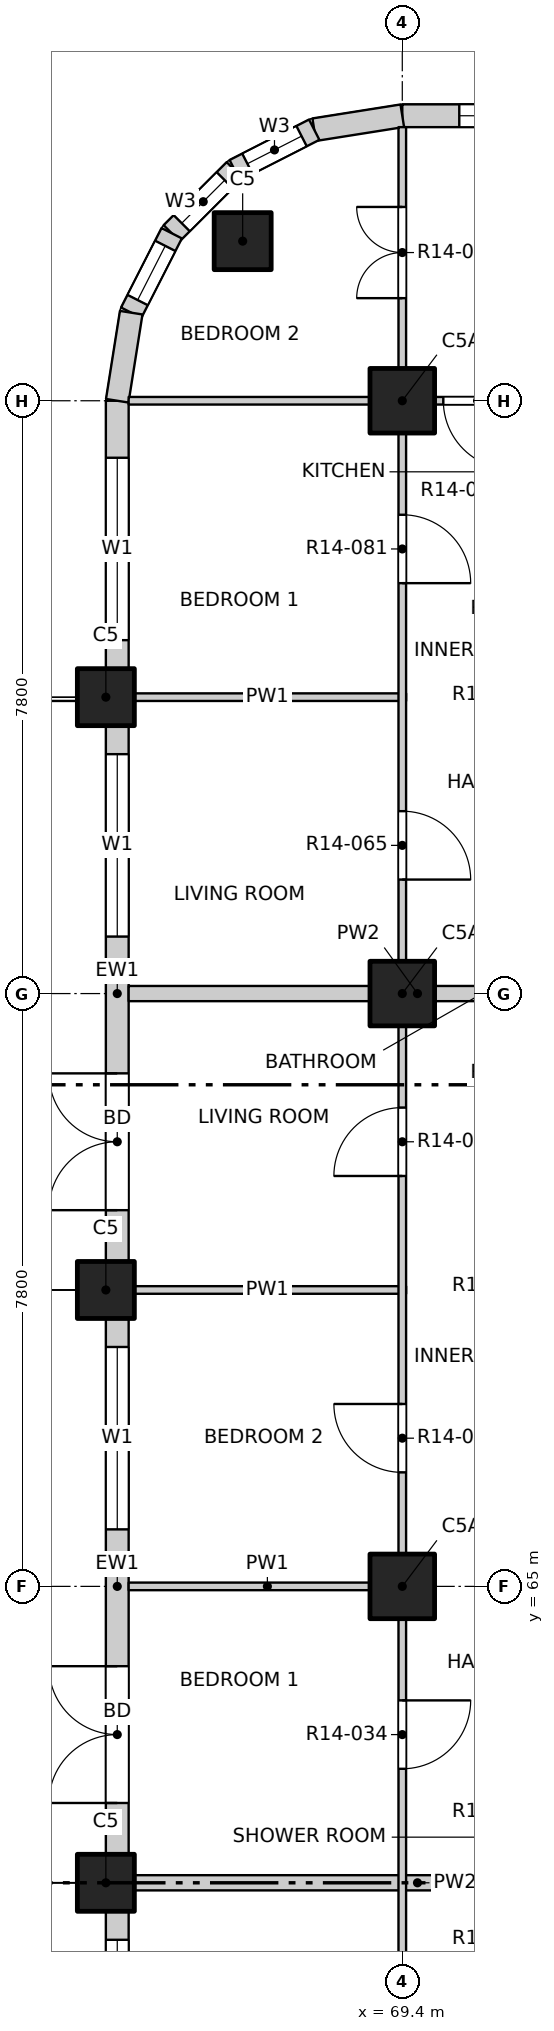
"""IFC4 building model, lengths in metres.
Left out: names, types, materials, properties, quantities, classifications, styles, units other than length and angle.
Written with IfcOpenShell. Run it as: python <this file> out.ifc"""

import sys

from ifc_helpers import new_model, si_unit, direction, frame, frame_2d, origin, origin_2d, place, context, subcontext, project, spatial, rectangle, extrude, element, fill, save


model = new_model("IFC4")
c1 = context("Model", 3, precision=1e-05, world=origin(), true_north=direction((0.0, 1.0)))
c2 = subcontext(c1, "Body", "Model", "MODEL_VIEW")
j1 = project(units=[si_unit("LENGTHUNIT", "METRE"), si_unit("PLANEANGLEUNIT", "RADIAN")], contexts=[c1])
p1 = place(None, origin())
s1 = spatial("IfcSite", under=j1, at=p1, CompositionType="ELEMENT")
p2 = place(p1, origin())
s2 = spatial("IfcBuilding", under=s1, at=p2, CompositionType="ELEMENT")
p3 = place(p2, frame((0.0, 0.0, 155.4)))
s3 = spatial("IfcBuildingStorey", under=s2, at=p3, CompositionType="ELEMENT", Elevation=155.4)
for number, where, z_axis, x_axis in (
    (1, (67.3, 82.7, -0.25), (0.0, 0.0, 1.0), (1.0, 0.0, 0.0)),
    (2, (65.5, 61.1, -0.25), (0.0, 0.0, 1.0), (1.0, 0.0, 0.0)),
    (3, (65.5, 68.9, -0.25), (0.0, 0.0, 1.0), (1.0, 0.0, 0.0)),
    (4, (65.5, 76.7, -0.25), (0.0, 0.0, 1.0), (1.0, 0.0, 0.0)),
):
    element("IfcColumn", number, at=place(p3, frame(where, z_axis=z_axis, x_axis=x_axis)), inside=s3, PredefinedType="COLUMN", context=c2, shape_type="SweptSolid", body=[
        extrude(rectangle(XDim=0.75, YDim=0.75, at=origin_2d()), origin(), (0.0, 0.0, 1.0), 3.4),
    ])
for number, where, z_axis, x_axis in (
    (5, (69.4, 65.0, -0.25), (0.0, 0.0, 1.0), (1.0, 0.0, 0.0)),
    (6, (69.4, 72.8, -0.25), (0.0, 0.0, 1.0), (1.0, 0.0, 0.0)),
    (7, (69.4, 80.6, -0.25), (0.0, 0.0, 1.0), (1.0, 0.0, 0.0)),
):
    element("IfcColumn", number, at=place(p3, frame(where, z_axis=z_axis, x_axis=x_axis)), inside=s3, PredefinedType="COLUMN", context=c2, shape_type="SweptSolid", body=[
        extrude(rectangle(XDim=0.85, YDim=0.85, at=origin_2d()), origin(), (0.0, 0.0, 1.0), 3.4),
    ])
p4 = place(p3, frame((69.4, 84.35, 0.0), z_axis=(0.0, 0.0, 1.0), x_axis=(1.0, 0.0, 0.0)))
e8 = element("IfcWall", 8, at=p4, inside=s3, PredefinedType="SOLIDWALL", context=c2, shape_type="SweptSolid", body=[
    extrude(rectangle(XDim=3.525, YDim=0.3, at=frame_2d((1.763, 0.0))), origin(), (0.0, 0.0, 1.0), 2.7),
])
p5 = place(p4, frame((0.75, 0.0, 0.9)))
e9 = element("IfcOpeningElement", 9, at=p5, cuts=e8, PredefinedType="OPENING", context=c2, shape_type="SweptSolid", body=[
    extrude(rectangle(XDim=2.4, YDim=1.8, at=frame_2d((1.2, 0.9))), frame((0.0, 0.16, 0.0), z_axis=(0.0, -1.0, 0.0), x_axis=(1.0, 0.0, 0.0)), (0.0, 0.0, 1.0), 0.32),
])
p6 = place(p3, frame((65.65, 53.675, 0.0), z_axis=(0.0, 0.0, 1.0), x_axis=(0.0, 1.0, 0.0)))
e10 = element("IfcWall", 10, at=p6, inside=s3, PredefinedType="SOLIDWALL", context=c2, shape_type="SweptSolid", body=[
    extrude(rectangle(XDim=7.05, YDim=0.3, at=frame_2d((3.525, 0.0))), origin(), (0.0, 0.0, 1.0), 2.7),
])
p7 = place(p6, frame((0.675, 0.0, 0.0)))
e11 = element("IfcOpeningElement", 11, at=p7, cuts=e10, PredefinedType="OPENING", context=c2, shape_type="SweptSolid", body=[
    extrude(rectangle(XDim=1.8, YDim=2.4, at=frame_2d((0.9, 1.2))), frame((0.0, 0.16, 0.0), z_axis=(0.0, -1.0, 0.0), x_axis=(1.0, 0.0, 0.0)), (0.0, 0.0, 1.0), 0.32),
])
p8 = place(p6, frame((4.275, 0.0, 0.9)))
e12 = element("IfcOpeningElement", 12, at=p8, cuts=e10, PredefinedType="OPENING", context=c2, shape_type="SweptSolid", body=[
    extrude(rectangle(XDim=2.4, YDim=1.8, at=frame_2d((1.2, 0.9))), frame((0.0, 0.16, 0.0), z_axis=(0.0, -1.0, 0.0), x_axis=(1.0, 0.0, 0.0)), (0.0, 0.0, 1.0), 0.32),
])
p9 = place(p3, frame((65.65, 61.475, 0.0), z_axis=(0.0, 0.0, 1.0), x_axis=(0.0, 1.0, 0.0)))
e13 = element("IfcWall", 13, at=p9, inside=s3, PredefinedType="SOLIDWALL", context=c2, shape_type="SweptSolid", body=[
    extrude(rectangle(XDim=7.05, YDim=0.3, at=frame_2d((3.525, 0.0))), origin(), (0.0, 0.0, 1.0), 2.7),
])
p10 = place(p9, frame((0.675, 0.0, 0.0)))
e14 = element("IfcOpeningElement", 14, at=p10, cuts=e13, PredefinedType="OPENING", context=c2, shape_type="SweptSolid", body=[
    extrude(rectangle(XDim=1.8, YDim=2.4, at=frame_2d((0.9, 1.2))), frame((0.0, 0.16, 0.0), z_axis=(0.0, -1.0, 0.0), x_axis=(1.0, 0.0, 0.0)), (0.0, 0.0, 1.0), 0.32),
])
p11 = place(p9, frame((4.275, 0.0, 0.9)))
e15 = element("IfcOpeningElement", 15, at=p11, cuts=e13, PredefinedType="OPENING", context=c2, shape_type="SweptSolid", body=[
    extrude(rectangle(XDim=2.4, YDim=1.8, at=frame_2d((1.2, 0.9))), frame((0.0, 0.16, 0.0), z_axis=(0.0, -1.0, 0.0), x_axis=(1.0, 0.0, 0.0)), (0.0, 0.0, 1.0), 0.32),
])
p12 = place(p3, frame((65.65, 69.275, 0.0), z_axis=(0.0, 0.0, 1.0), x_axis=(0.0, 1.0, 0.0)))
e16 = element("IfcWall", 16, at=p12, inside=s3, PredefinedType="SOLIDWALL", context=c2, shape_type="SweptSolid", body=[
    extrude(rectangle(XDim=7.05, YDim=0.3, at=frame_2d((3.525, 0.0))), origin(), (0.0, 0.0, 1.0), 2.7),
])
p13 = place(p12, frame((0.675, 0.0, 0.0)))
e17 = element("IfcOpeningElement", 17, at=p13, cuts=e16, PredefinedType="OPENING", context=c2, shape_type="SweptSolid", body=[
    extrude(rectangle(XDim=1.8, YDim=2.4, at=frame_2d((0.9, 1.2))), frame((0.0, 0.16, 0.0), z_axis=(0.0, -1.0, 0.0), x_axis=(1.0, 0.0, 0.0)), (0.0, 0.0, 1.0), 0.32),
])
p14 = place(p12, frame((4.275, 0.0, 0.9)))
e18 = element("IfcOpeningElement", 18, at=p14, cuts=e16, PredefinedType="OPENING", context=c2, shape_type="SweptSolid", body=[
    extrude(rectangle(XDim=2.4, YDim=1.8, at=frame_2d((1.2, 0.9))), frame((0.0, 0.16, 0.0), z_axis=(0.0, -1.0, 0.0), x_axis=(1.0, 0.0, 0.0)), (0.0, 0.0, 1.0), 0.32),
])
p15 = place(p3, frame((65.65, 77.075, 0.0), z_axis=(0.0, 0.0, 1.0), x_axis=(0.0, 1.0, 0.0)))
e19 = element("IfcWall", 19, at=p15, inside=s3, PredefinedType="SOLIDWALL", context=c2, shape_type="SweptSolid", body=[
    extrude(rectangle(XDim=3.525, YDim=0.3, at=frame_2d((1.763, 0.0))), origin(), (0.0, 0.0, 1.0), 2.7),
])
p16 = place(p15, frame((0.375, 0.0, 0.9)))
e20 = element("IfcOpeningElement", 20, at=p16, cuts=e19, PredefinedType="OPENING", context=c2, shape_type="SweptSolid", body=[
    extrude(rectangle(XDim=2.4, YDim=1.8, at=frame_2d((1.2, 0.9))), frame((0.0, 0.16, 0.0), z_axis=(0.0, -1.0, 0.0), x_axis=(1.0, 0.0, 0.0)), (0.0, 0.0, 1.0), 0.32),
])
p17 = place(p3, frame((69.4, 84.35, 0.0), z_axis=(0.0, 0.0, 1.0), x_axis=(-0.987678452879, -0.156496880861, 0.0)))
e21 = element("IfcWall", 21, at=p17, inside=s3, PredefinedType="SOLIDWALL", context=c2, shape_type="SweptSolid", body=[
    extrude(rectangle(XDim=1.173, YDim=0.3, at=frame_2d((0.586, 0.0))), origin(), (0.0, 0.0, 1.0), 2.7),
])
p18 = place(p3, frame((68.241, 84.167, 0.0), z_axis=(0.0, 0.0, 1.0), x_axis=(-0.890988677504, -0.454025524128, 0.0)))
e22 = element("IfcWall", 22, at=p18, inside=s3, PredefinedType="SOLIDWALL", context=c2, shape_type="SweptSolid", body=[
    extrude(rectangle(XDim=1.173, YDim=0.3, at=frame_2d((0.587, 0.0))), origin(), (0.0, 0.0, 1.0), 2.7),
])
p19 = place(p18, frame((0.187, 0.0, 0.9)))
e23 = element("IfcOpeningElement", 23, at=p19, cuts=e22, PredefinedType="OPENING", context=c2, shape_type="SweptSolid", body=[
    extrude(rectangle(XDim=0.8, YDim=1.2, at=frame_2d((0.4, 0.6))), frame((0.0, 0.16, 0.0), z_axis=(0.0, -1.0, 0.0), x_axis=(1.0, 0.0, 0.0)), (0.0, 0.0, 1.0), 0.32),
])
p20 = place(p3, frame((67.196, 83.634, 0.0), z_axis=(0.0, 0.0, 1.0), x_axis=(-0.707106781187, -0.707106781187, 0.0)))
e24 = element("IfcWall", 24, at=p20, inside=s3, PredefinedType="SOLIDWALL", context=c2, shape_type="SweptSolid", body=[
    extrude(rectangle(XDim=1.173, YDim=0.3, at=frame_2d((0.586, 0.0))), origin(), (0.0, 0.0, 1.0), 2.7),
])
p21 = place(p20, frame((0.187, 0.0, 0.9)))
e25 = element("IfcOpeningElement", 25, at=p21, cuts=e24, PredefinedType="OPENING", context=c2, shape_type="SweptSolid", body=[
    extrude(rectangle(XDim=0.8, YDim=1.2, at=frame_2d((0.4, 0.6))), frame((0.0, 0.16, 0.0), z_axis=(0.0, -1.0, 0.0), x_axis=(1.0, 0.0, 0.0)), (0.0, 0.0, 1.0), 0.32),
])
p22 = place(p3, frame((66.366, 82.804, 0.0), z_axis=(0.0, 0.0, 1.0), x_axis=(-0.454025524128, -0.890988677504, 0.0)))
e26 = element("IfcWall", 26, at=p22, inside=s3, PredefinedType="SOLIDWALL", context=c2, shape_type="SweptSolid", body=[
    extrude(rectangle(XDim=1.173, YDim=0.3, at=frame_2d((0.587, 0.0))), origin(), (0.0, 0.0, 1.0), 2.7),
])
p23 = place(p22, frame((0.187, 0.0, 0.9)))
e27 = element("IfcOpeningElement", 27, at=p23, cuts=e26, PredefinedType="OPENING", context=c2, shape_type="SweptSolid", body=[
    extrude(rectangle(XDim=0.8, YDim=1.2, at=frame_2d((0.4, 0.6))), frame((0.0, 0.16, 0.0), z_axis=(0.0, -1.0, 0.0), x_axis=(1.0, 0.0, 0.0)), (0.0, 0.0, 1.0), 0.32),
])
p24 = place(p3, frame((65.833, 81.759, 0.0), z_axis=(0.0, 0.0, 1.0), x_axis=(-0.156496880861, -0.987678452879, 0.0)))
e28 = element("IfcWall", 28, at=p24, inside=s3, PredefinedType="SOLIDWALL", context=c2, shape_type="SweptSolid", body=[
    extrude(rectangle(XDim=1.173, YDim=0.3, at=frame_2d((0.586, 0.0))), origin(), (0.0, 0.0, 1.0), 2.7),
])
p25 = place(p3, frame((65.8, 61.1, 0.0), z_axis=(0.0, 0.0, 1.0), x_axis=(1.0, 0.0, 0.0)))
e29 = element("IfcWall", 29, at=p25, inside=s3, PredefinedType="PARTITIONING", context=c2, shape_type="SweptSolid", body=[
    extrude(rectangle(XDim=7.6, YDim=0.2, at=frame_2d((3.8, 0.0))), origin(), (0.0, 0.0, 1.0), 2.55),
])
p26 = place(p3, frame((65.8, 65.0, 0.0), z_axis=(0.0, 0.0, 1.0), x_axis=(1.0, 0.0, 0.0)))
e30 = element("IfcWall", 30, at=p26, inside=s3, PredefinedType="PARTITIONING", context=c2, shape_type="SweptSolid", body=[
    extrude(rectangle(XDim=3.65, YDim=0.1, at=frame_2d((1.825, 0.0))), origin(), (0.0, 0.0, 1.0), 3.15),
])
p27 = place(p3, frame((65.8, 68.9, 0.0), z_axis=(0.0, 0.0, 1.0), x_axis=(1.0, 0.0, 0.0)))
e31 = element("IfcWall", 31, at=p27, inside=s3, PredefinedType="PARTITIONING", context=c2, shape_type="SweptSolid", body=[
    extrude(rectangle(XDim=3.65, YDim=0.1, at=frame_2d((1.825, 0.0))), origin(), (0.0, 0.0, 1.0), 2.55),
])
p28 = place(p3, frame((65.8, 72.8, 0.0), z_axis=(0.0, 0.0, 1.0), x_axis=(1.0, 0.0, 0.0)))
e32 = element("IfcWall", 32, at=p28, inside=s3, PredefinedType="PARTITIONING", context=c2, shape_type="SweptSolid", body=[
    extrude(rectangle(XDim=7.6, YDim=0.2, at=frame_2d((3.8, 0.0))), origin(), (0.0, 0.0, 1.0), 3.15),
])
p29 = place(p3, frame((65.8, 76.7, 0.0), z_axis=(0.0, 0.0, 1.0), x_axis=(1.0, 0.0, 0.0)))
e33 = element("IfcWall", 33, at=p29, inside=s3, PredefinedType="PARTITIONING", context=c2, shape_type="SweptSolid", body=[
    extrude(rectangle(XDim=3.65, YDim=0.1, at=frame_2d((1.825, 0.0))), origin(), (0.0, 0.0, 1.0), 2.55),
])
p30 = place(p3, frame((65.8, 80.6, 0.0), z_axis=(0.0, 0.0, 1.0), x_axis=(1.0, 0.0, 0.0)))
e34 = element("IfcWall", 34, at=p30, inside=s3, PredefinedType="PARTITIONING", context=c2, shape_type="SweptSolid", body=[
    extrude(rectangle(XDim=7.6, YDim=0.1, at=frame_2d((3.8, 0.0))), origin(), (0.0, 0.0, 1.0), 3.15),
])
p31 = place(p30, frame((4.14, 0.0, 0.0)))
e35 = element("IfcOpeningElement", 35, at=p31, cuts=e34, PredefinedType="OPENING", context=c2, shape_type="SweptSolid", body=[
    extrude(rectangle(XDim=0.9, YDim=2.1, at=frame_2d((0.45, 1.05))), frame((0.0, 0.06, 0.0), z_axis=(0.0, -1.0, 0.0), x_axis=(1.0, 0.0, 0.0)), (0.0, 0.0, 1.0), 0.12),
])
p32 = place(p3, frame((69.4, 45.8, 0.0), z_axis=(0.0, 0.0, 1.0), x_axis=(0.0, 1.0, 0.0)))
e36 = element("IfcWall", 36, at=p32, inside=s3, PredefinedType="PARTITIONING", context=c2, shape_type="SweptSolid", body=[
    extrude(rectangle(XDim=38.4, YDim=0.1, at=frame_2d((19.2, 0.0))), origin(), (0.0, 0.0, 1.0), 3.15),
])
p33 = place(p32, frame((1.05, 0.0, 0.0)))
e37 = element("IfcOpeningElement", 37, at=p33, cuts=e36, PredefinedType="OPENING", context=c2, shape_type="SweptSolid", body=[
    extrude(rectangle(XDim=1.2, YDim=2.1, at=frame_2d((0.6, 1.05))), frame((0.0, 0.06, 0.0), z_axis=(0.0, -1.0, 0.0), x_axis=(1.0, 0.0, 0.0)), (0.0, 0.0, 1.0), 0.12),
])
p34 = place(p32, frame((6.9, 0.0, 0.0)))
e38 = element("IfcOpeningElement", 38, at=p34, cuts=e36, PredefinedType="OPENING", context=c2, shape_type="SweptSolid", body=[
    extrude(rectangle(XDim=1.2, YDim=2.1, at=frame_2d((0.6, 1.05))), frame((0.0, 0.06, 0.0), z_axis=(0.0, -1.0, 0.0), x_axis=(1.0, 0.0, 0.0)), (0.0, 0.0, 1.0), 0.12),
])
p35 = place(p32, frame((12.9, 0.0, 0.0)))
e39 = element("IfcOpeningElement", 39, at=p35, cuts=e36, PredefinedType="OPENING", context=c2, shape_type="SweptSolid", body=[
    extrude(rectangle(XDim=0.9, YDim=2.1, at=frame_2d((0.45, 1.05))), frame((0.0, 0.06, 0.0), z_axis=(0.0, -1.0, 0.0), x_axis=(1.0, 0.0, 0.0)), (0.0, 0.0, 1.0), 0.12),
])
p36 = place(p32, frame((16.8, 0.0, 0.0)))
e40 = element("IfcOpeningElement", 40, at=p36, cuts=e36, PredefinedType="OPENING", context=c2, shape_type="SweptSolid", body=[
    extrude(rectangle(XDim=0.9, YDim=2.1, at=frame_2d((0.45, 1.05))), frame((0.0, 0.06, 0.0), z_axis=(0.0, -1.0, 0.0), x_axis=(1.0, 0.0, 0.0)), (0.0, 0.0, 1.0), 0.12),
])
p37 = place(p32, frame((20.7, 0.0, 0.0)))
e41 = element("IfcOpeningElement", 41, at=p37, cuts=e36, PredefinedType="OPENING", context=c2, shape_type="SweptSolid", body=[
    extrude(rectangle(XDim=0.9, YDim=2.1, at=frame_2d((0.45, 1.05))), frame((0.0, 0.06, 0.0), z_axis=(0.0, -1.0, 0.0), x_axis=(1.0, 0.0, 0.0)), (0.0, 0.0, 1.0), 0.12),
])
p38 = place(p32, frame((24.6, 0.0, 0.0)))
e42 = element("IfcOpeningElement", 42, at=p38, cuts=e36, PredefinedType="OPENING", context=c2, shape_type="SweptSolid", body=[
    extrude(rectangle(XDim=0.9, YDim=2.1, at=frame_2d((0.45, 1.05))), frame((0.0, 0.06, 0.0), z_axis=(0.0, -1.0, 0.0), x_axis=(1.0, 0.0, 0.0)), (0.0, 0.0, 1.0), 0.12),
])
p39 = place(p32, frame((28.5, 0.0, 0.0)))
e43 = element("IfcOpeningElement", 43, at=p39, cuts=e36, PredefinedType="OPENING", context=c2, shape_type="SweptSolid", body=[
    extrude(rectangle(XDim=0.9, YDim=2.1, at=frame_2d((0.45, 1.05))), frame((0.0, 0.06, 0.0), z_axis=(0.0, -1.0, 0.0), x_axis=(1.0, 0.0, 0.0)), (0.0, 0.0, 1.0), 0.12),
])
p40 = place(p32, frame((32.4, 0.0, 0.0)))
e44 = element("IfcOpeningElement", 44, at=p40, cuts=e36, PredefinedType="OPENING", context=c2, shape_type="SweptSolid", body=[
    extrude(rectangle(XDim=0.9, YDim=2.1, at=frame_2d((0.45, 1.05))), frame((0.0, 0.06, 0.0), z_axis=(0.0, -1.0, 0.0), x_axis=(1.0, 0.0, 0.0)), (0.0, 0.0, 1.0), 0.12),
])
p41 = place(p32, frame((36.15, 0.0, 0.0)))
e45 = element("IfcOpeningElement", 45, at=p41, cuts=e36, PredefinedType="OPENING", context=c2, shape_type="SweptSolid", body=[
    extrude(rectangle(XDim=1.2, YDim=2.1, at=frame_2d((0.6, 1.05))), frame((0.0, 0.06, 0.0), z_axis=(0.0, -1.0, 0.0), x_axis=(1.0, 0.0, 0.0)), (0.0, 0.0, 1.0), 0.12),
])
p42 = place(p5, origin())
e46 = element("IfcWindow", 46, at=p42, inside=s3, PartitioningType="DOUBLE_PANEL_VERTICAL", PredefinedType="WINDOW", context=c2, shape_type="SweptSolid", body=[
    extrude(rectangle(XDim=2.4, YDim=1.8, at=frame_2d((1.2, 0.9))), frame((0.0, 0.03, 0.0), z_axis=(0.0, -1.0, 0.0), x_axis=(1.0, 0.0, 0.0)), (0.0, 0.0, 1.0), 0.06),
])
fill(e9, e46)
p43 = place(p8, origin())
e47 = element("IfcWindow", 47, at=p43, inside=s3, PartitioningType="DOUBLE_PANEL_VERTICAL", PredefinedType="WINDOW", context=c2, shape_type="SweptSolid", body=[
    extrude(rectangle(XDim=2.4, YDim=1.8, at=frame_2d((1.2, 0.9))), frame((0.0, 0.03, 0.0), z_axis=(0.0, -1.0, 0.0), x_axis=(1.0, 0.0, 0.0)), (0.0, 0.0, 1.0), 0.06),
])
fill(e12, e47)
p44 = place(p10, origin())
e48 = element("IfcDoor", 48, at=p44, inside=s3, OperationType="DOUBLE_DOOR_SINGLE_SWING", PredefinedType="DOOR", context=c2, shape_type="SweptSolid", body=[
    extrude(rectangle(XDim=1.8, YDim=2.4, at=frame_2d((0.9, 1.2))), frame((0.0, 0.025, 0.0), z_axis=(0.0, -1.0, 0.0), x_axis=(1.0, 0.0, 0.0)), (0.0, 0.0, 1.0), 0.05),
])
fill(e14, e48)
p45 = place(p11, origin())
e49 = element("IfcWindow", 49, at=p45, inside=s3, PartitioningType="DOUBLE_PANEL_VERTICAL", PredefinedType="WINDOW", context=c2, shape_type="SweptSolid", body=[
    extrude(rectangle(XDim=2.4, YDim=1.8, at=frame_2d((1.2, 0.9))), frame((0.0, 0.03, 0.0), z_axis=(0.0, -1.0, 0.0), x_axis=(1.0, 0.0, 0.0)), (0.0, 0.0, 1.0), 0.06),
])
fill(e15, e49)
p46 = place(p13, origin())
e50 = element("IfcDoor", 50, at=p46, inside=s3, OperationType="DOUBLE_DOOR_SINGLE_SWING", PredefinedType="DOOR", context=c2, shape_type="SweptSolid", body=[
    extrude(rectangle(XDim=1.8, YDim=2.4, at=frame_2d((0.9, 1.2))), frame((0.0, 0.025, 0.0), z_axis=(0.0, -1.0, 0.0), x_axis=(1.0, 0.0, 0.0)), (0.0, 0.0, 1.0), 0.05),
])
fill(e17, e50)
p47 = place(p14, origin())
e51 = element("IfcWindow", 51, at=p47, inside=s3, PartitioningType="DOUBLE_PANEL_VERTICAL", PredefinedType="WINDOW", context=c2, shape_type="SweptSolid", body=[
    extrude(rectangle(XDim=2.4, YDim=1.8, at=frame_2d((1.2, 0.9))), frame((0.0, 0.03, 0.0), z_axis=(0.0, -1.0, 0.0), x_axis=(1.0, 0.0, 0.0)), (0.0, 0.0, 1.0), 0.06),
])
fill(e18, e51)
p48 = place(p16, origin())
e52 = element("IfcWindow", 52, at=p48, inside=s3, PartitioningType="DOUBLE_PANEL_VERTICAL", PredefinedType="WINDOW", context=c2, shape_type="SweptSolid", body=[
    extrude(rectangle(XDim=2.4, YDim=1.8, at=frame_2d((1.2, 0.9))), frame((0.0, 0.03, 0.0), z_axis=(0.0, -1.0, 0.0), x_axis=(1.0, 0.0, 0.0)), (0.0, 0.0, 1.0), 0.06),
])
fill(e20, e52)
p49 = place(p19, origin())
e53 = element("IfcWindow", 53, at=p49, inside=s3, PartitioningType="SINGLE_PANEL", PredefinedType="WINDOW", context=c2, shape_type="SweptSolid", body=[
    extrude(rectangle(XDim=0.8, YDim=1.2, at=frame_2d((0.4, 0.6))), frame((0.0, 0.03, 0.0), z_axis=(0.0, -1.0, 0.0), x_axis=(1.0, 0.0, 0.0)), (0.0, 0.0, 1.0), 0.06),
])
fill(e23, e53)
p50 = place(p21, origin())
e54 = element("IfcWindow", 54, at=p50, inside=s3, PartitioningType="SINGLE_PANEL", PredefinedType="WINDOW", context=c2, shape_type="SweptSolid", body=[
    extrude(rectangle(XDim=0.8, YDim=1.2, at=frame_2d((0.4, 0.6))), frame((0.0, 0.03, 0.0), z_axis=(0.0, -1.0, 0.0), x_axis=(1.0, 0.0, 0.0)), (0.0, 0.0, 1.0), 0.06),
])
fill(e25, e54)
p51 = place(p23, origin())
e55 = element("IfcWindow", 55, at=p51, inside=s3, PartitioningType="SINGLE_PANEL", PredefinedType="WINDOW", context=c2, shape_type="SweptSolid", body=[
    extrude(rectangle(XDim=0.8, YDim=1.2, at=frame_2d((0.4, 0.6))), frame((0.0, 0.03, 0.0), z_axis=(0.0, -1.0, 0.0), x_axis=(1.0, 0.0, 0.0)), (0.0, 0.0, 1.0), 0.06),
])
fill(e27, e55)
p52 = place(p36, origin())
e56 = element("IfcDoor", 56, at=p52, inside=s3, OperationType="SINGLE_SWING_LEFT", PredefinedType="DOOR", context=c2, shape_type="SweptSolid", body=[
    extrude(rectangle(XDim=0.9, YDim=2.1, at=frame_2d((0.45, 1.05))), frame((0.0, 0.025, 0.0), z_axis=(0.0, -1.0, 0.0), x_axis=(1.0, 0.0, 0.0)), (0.0, 0.0, 1.0), 0.05),
])
fill(e40, e56)
p53 = place(p37, origin())
e57 = element("IfcDoor", 57, at=p53, inside=s3, OperationType="SINGLE_SWING_RIGHT", PredefinedType="DOOR", context=c2, shape_type="SweptSolid", body=[
    extrude(rectangle(XDim=0.9, YDim=2.1, at=frame_2d((0.45, 1.05))), frame((0.0, 0.025, 0.0), z_axis=(0.0, -1.0, 0.0), x_axis=(1.0, 0.0, 0.0)), (0.0, 0.0, 1.0), 0.05),
])
fill(e41, e57)
p54 = place(p38, origin())
e58 = element("IfcDoor", 58, at=p54, inside=s3, OperationType="SINGLE_SWING_LEFT", PredefinedType="DOOR", context=c2, shape_type="SweptSolid", body=[
    extrude(rectangle(XDim=0.9, YDim=2.1, at=frame_2d((0.45, 1.05))), frame((0.0, 0.025, 0.0), z_axis=(0.0, -1.0, 0.0), x_axis=(1.0, 0.0, 0.0)), (0.0, 0.0, 1.0), 0.05),
])
fill(e42, e58)
p55 = place(p39, origin())
e59 = element("IfcDoor", 59, at=p55, inside=s3, OperationType="SINGLE_SWING_RIGHT", PredefinedType="DOOR", context=c2, shape_type="SweptSolid", body=[
    extrude(rectangle(XDim=0.9, YDim=2.1, at=frame_2d((0.45, 1.05))), frame((0.0, 0.025, 0.0), z_axis=(0.0, -1.0, 0.0), x_axis=(1.0, 0.0, 0.0)), (0.0, 0.0, 1.0), 0.05),
])
fill(e43, e59)
p56 = place(p40, origin())
e60 = element("IfcDoor", 60, at=p56, inside=s3, OperationType="SINGLE_SWING_RIGHT", PredefinedType="DOOR", context=c2, shape_type="SweptSolid", body=[
    extrude(rectangle(XDim=0.9, YDim=2.1, at=frame_2d((0.45, 1.05))), frame((0.0, 0.025, 0.0), z_axis=(0.0, -1.0, 0.0), x_axis=(1.0, 0.0, 0.0)), (0.0, 0.0, 1.0), 0.05),
])
fill(e44, e60)
p57 = place(p31, origin())
e61 = element("IfcDoor", 61, at=p57, inside=s3, OperationType="SINGLE_SWING_LEFT", PredefinedType="DOOR", context=c2, shape_type="SweptSolid", body=[
    extrude(rectangle(XDim=0.9, YDim=2.1, at=frame_2d((0.45, 1.05))), frame((0.0, 0.025, 0.0), z_axis=(0.0, -1.0, 0.0), x_axis=(1.0, 0.0, 0.0)), (0.0, 0.0, 1.0), 0.05),
])
fill(e35, e61)
p58 = place(p41, origin())
e62 = element("IfcDoor", 62, at=p58, inside=s3, OperationType="DOUBLE_DOOR_SINGLE_SWING", PredefinedType="DOOR", context=c2, shape_type="SweptSolid", body=[
    extrude(rectangle(XDim=1.2, YDim=2.1, at=frame_2d((0.6, 1.05))), frame((0.0, 0.025, 0.0), z_axis=(0.0, -1.0, 0.0), x_axis=(1.0, 0.0, 0.0)), (0.0, 0.0, 1.0), 0.05),
])
fill(e45, e62)
save(model, sys.argv[1])
